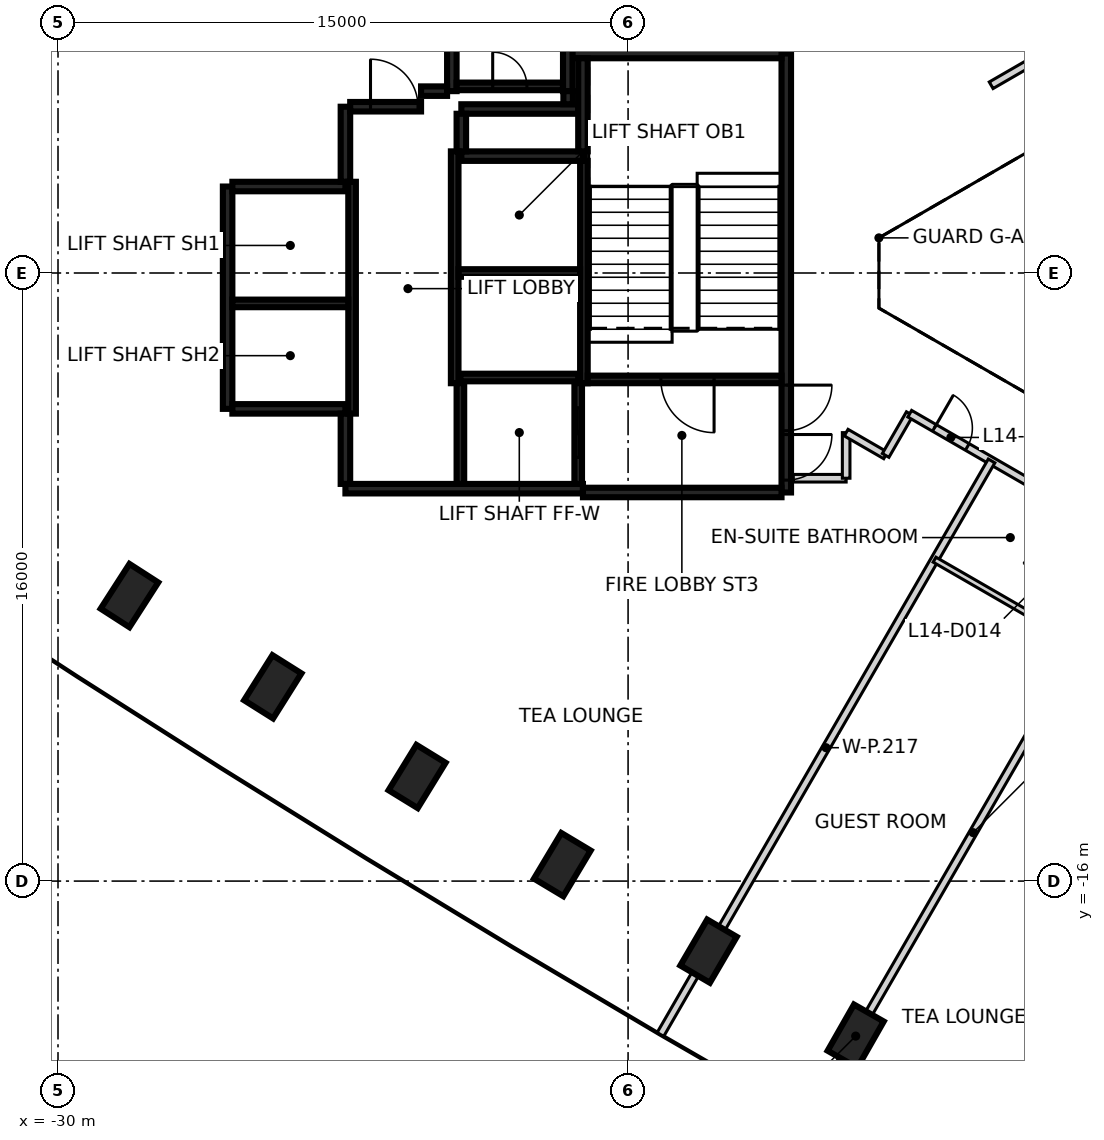
"""IFC4 building model, lengths in metres.
Left out: names, types, materials, properties, quantities, classifications, styles, units other than length and angle.
Written with IfcOpenShell. Run it as: python <this file> out.ifc"""

import sys

from ifc_helpers import new_model, si_unit, direction, frame, frame_2d, origin, origin_2d, place, context, subcontext, project, spatial, rectangle, extrude, element, fill, save


model = new_model("IFC4")
c1 = context("Model", 3, precision=1e-05, world=origin(), true_north=direction((0.0, 1.0)))
c2 = subcontext(c1, "Body", "Model", "MODEL_VIEW")
j1 = project(units=[si_unit("LENGTHUNIT", "METRE"), si_unit("PLANEANGLEUNIT", "RADIAN")], contexts=[c1])
p1 = place(None, origin())
s1 = spatial("IfcSite", under=j1, at=p1, CompositionType="ELEMENT")
p2 = place(p1, origin())
s2 = spatial("IfcBuilding", under=s1, at=p2, CompositionType="ELEMENT")
p3 = place(p2, frame((0.0, 0.0, 63.8)))
s3 = spatial("IfcBuildingStorey", under=s2, at=p3, CompositionType="ELEMENT", Elevation=63.8)
for number, where, z_axis, x_axis in (
    (1, (-28.12, -8.488, -0.475), (0.0, 0.0, 1.0), (0.541, 0.841, 0.0)),
    (2, (-24.349, -10.888, -0.475), (0.0, 0.0, 1.0), (0.532, 0.846, 0.0)),
    (3, (-20.552, -13.248, -0.475), (0.0, 0.0, 1.0), (0.523, 0.852, 0.0)),
    (4, (-16.73, -15.566, -0.475), (0.0, 0.0, 1.0), (0.514, 0.858, 0.0)),
    (5, (-12.883, -17.844, -0.475), (0.0, 0.0, 1.0), (0.505, 0.863, 0.0)),
    (6, (-9.011, -20.079, -0.475), (0.0, 0.0, 1.0), (0.495, 0.869, 0.0)),
):
    element("IfcColumn", number, at=place(p3, frame(where, z_axis=z_axis, x_axis=x_axis)), inside=s3, PredefinedType="COLUMN", context=c2, shape_type="SweptSolid", body=[
        extrude(rectangle(XDim=1.4, YDim=0.9, at=origin_2d()), origin(), (0.0, 0.0, 1.0), 3.6),
    ])
p4 = place(p3, frame((-10.837, 5.775, 0.0), z_axis=(0.0, 0.0, 1.0), x_axis=(0.0, -1.0, 0.0)))
e7 = element("IfcWall", 7, at=p4, inside=s3, PredefinedType="SHEAR", context=c2, shape_type="SweptSolid", body=[
    extrude(rectangle(XDim=11.55, YDim=0.25, at=frame_2d((5.775, 0.0))), origin(), (0.0, 0.0, 1.0), 3.125),
])
p5 = place(p4, frame((10.025, 0.0, 0.0)))
e8 = element("IfcOpeningElement", 8, at=p5, cuts=e7, PredefinedType="OPENING", context=c2, shape_type="SweptSolid", body=[
    extrude(rectangle(XDim=1.2, YDim=2.1, at=frame_2d((0.6, 1.05))), frame((0.0, 0.135, 0.0), z_axis=(0.0, -1.0, 0.0), x_axis=(1.0, 0.0, 0.0)), (0.0, 0.0, 1.0), 0.27),
])
p6 = place(p4, frame((8.725, 0.0, 0.0)))
e9 = element("IfcOpeningElement", 9, at=p6, cuts=e7, PredefinedType="OPENING", context=c2, shape_type="SweptSolid", body=[
    extrude(rectangle(XDim=1.2, YDim=2.1, at=frame_2d((0.6, 1.05))), frame((0.0, 0.135, 0.0), z_axis=(0.0, -1.0, 0.0), x_axis=(1.0, 0.0, 0.0)), (0.0, 0.0, 1.0), 0.27),
])
p7 = place(p3, frame((-16.187, -5.675, 0.0), z_axis=(0.0, 0.0, 1.0), x_axis=(-1.0, 0.0, 0.0)))
e10 = element("IfcWall", 10, at=p7, inside=s3, PredefinedType="SHEAR", context=c2, shape_type="SweptSolid", body=[
    extrude(rectangle(XDim=6.25, YDim=0.25, at=frame_2d((3.125, 0.0))), origin(), (0.0, 0.0, 1.0), 3.125),
])
p8 = place(p3, frame((-25.537, -3.575, 0.0), z_axis=(0.0, 0.0, 1.0), x_axis=(0.0, 1.0, 0.0)))
e11 = element("IfcWall", 11, at=p8, inside=s3, PredefinedType="SHEAR", context=c2, shape_type="SweptSolid", body=[
    extrude(rectangle(XDim=5.85, YDim=0.25, at=frame_2d((2.925, 0.0))), origin(), (0.0, 0.0, 1.0), 3.125),
])
p9 = place(p3, frame((-10.963, -5.775, 0.0), z_axis=(0.0, 0.0, 1.0), x_axis=(-1.0, 0.0, 0.0)))
e12 = element("IfcWall", 12, at=p9, inside=s3, PredefinedType="SHEAR", context=c2, shape_type="SweptSolid", body=[
    extrude(rectangle(XDim=5.225, YDim=0.25, at=frame_2d((2.612, 0.0))), origin(), (0.0, 0.0, 1.0), 3.125),
])
p10 = place(p3, frame((-16.472, 5.775, 0.0), z_axis=(0.0, 0.0, 1.0), x_axis=(1.0, 0.0, 0.0)))
e13 = element("IfcWall", 13, at=p10, inside=s3, PredefinedType="SHEAR", context=c2, shape_type="SweptSolid", body=[
    extrude(rectangle(XDim=5.51, YDim=0.25, at=frame_2d((2.755, 0.0))), origin(), (0.0, 0.0, 1.0), 3.125),
])
p11 = place(p3, frame((-19.387, 3.075, 0.0), z_axis=(0.0, 0.0, 1.0), x_axis=(1.0, 0.0, 0.0)))
e14 = element("IfcWall", 14, at=p11, inside=s3, PredefinedType="SHEAR", context=c2, shape_type="SweptSolid", body=[
    extrude(rectangle(XDim=3.2, YDim=0.25, at=frame_2d((1.6, 0.0))), origin(), (0.0, 0.0, 1.0), 3.125),
])
for number, where, z_axis, x_axis in (
    (15, (-22.437, -3.575, 0.0), (0.0, 0.0, 1.0), (-1.0, 0.0, 0.0)),
    (16, (-25.412, 2.275, 0.0), (0.0, 0.0, 1.0), (1.0, 0.0, 0.0)),
):
    element("IfcWall", number, at=place(p3, frame(where, z_axis=z_axis, x_axis=x_axis)), inside=s3, PredefinedType="SHEAR", context=c2, shape_type="SweptSolid", body=[
        extrude(rectangle(XDim=2.975, YDim=0.25, at=frame_2d((1.487, 0.0))), origin(), (0.0, 0.0, 1.0), 3.125),
    ])
for number, where, z_axis, x_axis in (
    (17, (-16.587, 7.65, 0.0), (0.0, 0.0, 1.0), (0.0, -1.0, 0.0)),
    (18, (-19.637, 4.785, 0.0), (0.0, 0.0, 1.0), (0.0, 1.0, 0.0)),
):
    element("IfcWall", number, at=place(p3, frame(where, z_axis=z_axis, x_axis=x_axis)), inside=s3, PredefinedType="SHEAR", context=c2, shape_type="SweptSolid", body=[
        extrude(rectangle(XDim=2.865, YDim=0.25, at=frame_2d((1.432, 0.0))), origin(), (0.0, 0.0, 1.0), 3.125),
    ])
p12 = place(p3, frame((-16.302, 4.315, 0.0), z_axis=(0.0, 0.0, 1.0), x_axis=(-1.0, 0.0, 0.0)))
e19 = element("IfcWall", 19, at=p12, inside=s3, PredefinedType="SHEAR", context=c2, shape_type="SweptSolid", body=[
    extrude(rectangle(XDim=3.085, YDim=0.25, at=frame_2d((1.542, 0.0))), origin(), (0.0, 0.0, 1.0), 3.125),
])
p13 = place(p3, frame((-16.187, 3.2, 0.0), z_axis=(0.0, 0.0, 1.0), x_axis=(0.0, 1.0, 0.0)))
e20 = element("IfcWall", 20, at=p13, inside=s3, PredefinedType="SHEAR", context=c2, shape_type="SweptSolid", body=[
    extrude(rectangle(XDim=2.449, YDim=0.25, at=frame_2d((1.225, 0.0))), origin(), (0.0, 0.0, 1.0), 3.125),
])
p14 = place(p3, frame((-22.437, 2.4, 0.0), z_axis=(0.0, 0.0, 1.0), x_axis=(0.0, 1.0, 0.0)))
e21 = element("IfcWall", 21, at=p14, inside=s3, PredefinedType="SHEAR", context=c2, shape_type="SweptSolid", body=[
    extrude(rectangle(XDim=1.975, YDim=0.25, at=frame_2d((0.987, 0.0))), origin(), (0.0, 0.0, 1.0), 3.125),
])
p15 = place(p3, frame((-22.437, -5.55, 0.0), z_axis=(0.0, 0.0, 1.0), x_axis=(0.0, 1.0, 0.0)))
e22 = element("IfcWall", 22, at=p15, inside=s3, PredefinedType="SHEAR", context=c2, shape_type="SweptSolid", body=[
    extrude(rectangle(XDim=1.849, YDim=0.25, at=frame_2d((0.925, 0.0))), origin(), (0.0, 0.0, 1.0), 3.125),
])
p16 = place(p3, frame((-22.312, 4.375, 0.0), z_axis=(0.0, 0.0, 1.0), x_axis=(1.0, 0.0, 0.0)))
e23 = element("IfcWall", 23, at=p16, inside=s3, PredefinedType="SHEAR", context=c2, shape_type="SweptSolid", body=[
    extrude(rectangle(XDim=1.865, YDim=0.25, at=frame_2d((0.932, 0.0))), origin(), (0.0, 0.0, 1.0), 3.125),
])
p17 = place(p16, frame((0.535, 0.0, 0.0)))
e24 = element("IfcOpeningElement", 24, at=p17, cuts=e23, PredefinedType="OPENING", context=c2, shape_type="SweptSolid", body=[
    extrude(rectangle(XDim=1.25, YDim=2.1, at=frame_2d((0.625, 1.05))), frame((0.0, 0.135, 0.0), z_axis=(0.0, -1.0, 0.0), x_axis=(1.0, 0.0, 0.0)), (0.0, 0.0, 1.0), 0.27),
])
p18 = place(p3, frame((-19.387, 4.19, 0.0), z_axis=(0.0, 0.0, 1.0), x_axis=(0.0, -1.0, 0.0)))
e25 = element("IfcWall", 25, at=p18, inside=s3, PredefinedType="SHEAR", context=c2, shape_type="SweptSolid", body=[
    extrude(rectangle(XDim=0.989, YDim=0.25, at=frame_2d((0.495, 0.0))), origin(), (0.0, 0.0, 1.0), 3.125),
])
p19 = place(p3, frame((-20.447, 4.785, 0.0), z_axis=(0.0, 0.0, 1.0), x_axis=(1.0, 0.0, 0.0)))
e26 = element("IfcWall", 26, at=p19, inside=s3, PredefinedType="SHEAR", context=c2, shape_type="SweptSolid", body=[
    extrude(rectangle(XDim=0.685, YDim=0.25, at=frame_2d((0.342, 0.0))), origin(), (0.0, 0.0, 1.0), 3.125),
])
p20 = place(p3, frame((-16.577, 4.785, 0.0), z_axis=(0.0, 0.0, 1.0), x_axis=(0.0, -1.0, 0.0)))
e27 = element("IfcWall", 27, at=p20, inside=s3, PredefinedType="SHEAR", context=c2, shape_type="SweptSolid", body=[
    extrude(rectangle(XDim=0.344, YDim=0.25, at=frame_2d((0.172, 0.0))), origin(), (0.0, 0.0, 1.0), 3.125),
])
p21 = place(p3, frame((-16.162, 2.951, 0.0), z_axis=(0.0, 0.0, 1.0), x_axis=(0.0, -1.0, 0.0)))
e28 = element("IfcWall", 28, at=p21, inside=s3, PredefinedType="SHEAR", context=c2, shape_type="SweptSolid", body=[
    extrude(rectangle(XDim=5.851, YDim=0.2, at=frame_2d((2.925, 0.0))), origin(), (0.0, 0.0, 1.0), 3.125),
])
for number, where, z_axis, x_axis in (
    (29, (-19.562, -2.9, 0.0), (0.0, 0.0, 1.0), (0.0, 1.0, 0.0)),
    (30, (-22.262, 2.4, 0.0), (0.0, 0.0, 1.0), (0.0, -1.0, 0.0)),
):
    element("IfcWall", number, at=place(p3, frame(where, z_axis=z_axis, x_axis=x_axis)), inside=s3, PredefinedType="SHEAR", context=c2, shape_type="SweptSolid", body=[
        extrude(rectangle(XDim=6.1, YDim=0.2, at=frame_2d((3.05, 0.0))), origin(), (0.0, 0.0, 1.0), 3.125),
    ])
p22 = place(p3, frame((-10.963, -2.8, 0.0), z_axis=(0.0, 0.0, 1.0), x_axis=(-1.0, 0.0, 0.0)))
e31 = element("IfcWall", 31, at=p22, inside=s3, PredefinedType="SHEAR", context=c2, shape_type="SweptSolid", body=[
    extrude(rectangle(XDim=5.098, YDim=0.2, at=frame_2d((2.549, 0.0))), origin(), (0.0, 0.0, 1.0), 3.125),
])
p23 = place(p22, frame((1.774, 0.0, 0.0)))
e32 = element("IfcOpeningElement", 32, at=p23, cuts=e31, PredefinedType="OPENING", context=c2, shape_type="SweptSolid", body=[
    extrude(rectangle(XDim=1.4, YDim=2.1, at=frame_2d((0.7, 1.05))), frame((0.0, 0.11, 0.0), z_axis=(0.0, -1.0, 0.0), x_axis=(1.0, 0.0, 0.0)), (0.0, 0.0, 1.0), 0.22),
])
p24 = place(p3, frame((-16.263, 0.0, 0.0), z_axis=(0.0, 0.0, 1.0), x_axis=(-1.0, 0.0, 0.0)))
e33 = element("IfcWall", 33, at=p24, inside=s3, PredefinedType="SHEAR", context=c2, shape_type="SweptSolid", body=[
    extrude(rectangle(XDim=3.198, YDim=0.2, at=frame_2d((1.599, 0.0))), origin(), (0.0, 0.0, 1.0), 3.125),
])
p25 = place(p3, frame((-22.363, -0.8, 0.0), z_axis=(0.0, 0.0, 1.0), x_axis=(-1.0, 0.0, 0.0)))
e34 = element("IfcWall", 34, at=p25, inside=s3, PredefinedType="SHEAR", context=c2, shape_type="SweptSolid", body=[
    extrude(rectangle(XDim=3.048, YDim=0.2, at=frame_2d((1.524, 0.0))), origin(), (0.0, 0.0, 1.0), 3.125),
])
p26 = place(p3, frame((-19.511, 4.91, 0.0), z_axis=(0.0, 0.0, 1.0), x_axis=(1.0, 0.0, 0.0)))
e35 = element("IfcWall", 35, at=p26, inside=s3, PredefinedType="SHEAR", context=c2, shape_type="SweptSolid", body=[
    extrude(rectangle(XDim=2.798, YDim=0.2, at=frame_2d((1.399, 0.0))), origin(), (0.0, 0.0, 1.0), 3.125),
])
p27 = place(p26, frame((0.949, 0.0, 0.0)))
e36 = element("IfcOpeningElement", 36, at=p27, cuts=e35, PredefinedType="OPENING", context=c2, shape_type="SweptSolid", body=[
    extrude(rectangle(XDim=0.9, YDim=2.1, at=frame_2d((0.45, 1.05))), frame((0.0, 0.11, 0.0), z_axis=(0.0, -1.0, 0.0), x_axis=(1.0, 0.0, 0.0)), (0.0, 0.0, 1.0), 0.22),
])
p28 = place(p3, frame((-19.412, -2.75, 0.0), z_axis=(0.0, 0.0, 1.0), x_axis=(1.0, 0.0, 0.0)))
e37 = element("IfcWall", 37, at=p28, inside=s3, PredefinedType="SHEAR", context=c2, shape_type="SweptSolid", body=[
    extrude(rectangle(XDim=3.1, YDim=0.2, at=frame_2d((1.55, 0.0))), origin(), (0.0, 0.0, 1.0), 3.125),
])
p29 = place(p3, frame((-16.312, -2.898, 0.0), z_axis=(0.0, 0.0, 1.0), x_axis=(0.0, -1.0, 0.0)))
e38 = element("IfcWall", 38, at=p29, inside=s3, PredefinedType="SHEAR", context=c2, shape_type="SweptSolid", body=[
    extrude(rectangle(XDim=2.651, YDim=0.2, at=frame_2d((1.325, 0.0))), origin(), (0.0, 0.0, 1.0), 3.125),
])
p30 = place(p29, frame((0.652, 0.0, 0.0)))
e39 = element("IfcOpeningElement", 39, at=p30, cuts=e38, PredefinedType="OPENING", context=c2, shape_type="SweptSolid", body=[
    extrude(rectangle(XDim=1.3, YDim=2.1, at=frame_2d((0.65, 1.05))), frame((0.0, 0.11, 0.0), z_axis=(0.0, -1.0, 0.0), x_axis=(1.0, 0.0, 0.0)), (0.0, 0.0, 1.0), 0.22),
])
p31 = place(p3, frame((-19.412, -5.549, 0.0), z_axis=(0.0, 0.0, 1.0), x_axis=(0.0, 1.0, 0.0)))
e40 = element("IfcWall", 40, at=p31, inside=s3, PredefinedType="SHEAR", context=c2, shape_type="SweptSolid", body=[
    extrude(rectangle(XDim=2.651, YDim=0.2, at=frame_2d((1.325, 0.0))), origin(), (0.0, 0.0, 1.0), 3.125),
])
p32 = place(p3, frame((-10.652, -5.4, 0.0), z_axis=(0.0, 0.0, 1.0), x_axis=(1.0, 0.0, 0.0)))
e41 = element("IfcWall", 41, at=p32, inside=s3, PredefinedType="PARTITIONING", context=c2, shape_type="SweptSolid", body=[
    extrude(rectangle(XDim=1.39, YDim=0.2, at=frame_2d((0.695, 0.0))), origin(), (0.0, 0.0, 1.0), 3.125),
])
for number, where, z_axis, x_axis in (
    (42, (-9.262, -5.4, 0.0), (0.0, 0.0, 1.0), (0.0, 1.0, 0.0)),
    (43, (-9.262, -4.2, 0.0), (0.0, 0.0, 1.0), (0.866, -0.5, 0.0)),
):
    element("IfcWall", number, at=place(p3, frame(where, z_axis=z_axis, x_axis=x_axis)), inside=s3, PredefinedType="PARTITIONING", context=c2, shape_type="SweptSolid", body=[
        extrude(rectangle(XDim=1.2, YDim=0.2, at=frame_2d((0.6, 0.0))), origin(), (0.0, 0.0, 1.0), 3.125),
    ])
p33 = place(p3, frame((-8.223, -4.8, 0.0), z_axis=(0.0, 0.0, 1.0), x_axis=(0.499866914522, 0.866102227088, 0.0)))
e44 = element("IfcWall", 44, at=p33, inside=s3, PredefinedType="PARTITIONING", context=c2, shape_type="SweptSolid", body=[
    extrude(rectangle(XDim=1.268, YDim=0.2, at=frame_2d((0.634, 0.0))), origin(), (0.0, 0.0, 1.0), 3.125),
])
p34 = place(p3, frame((-7.589, -3.702, 0.0), z_axis=(0.0, 0.0, 1.0), x_axis=(0.865995139556, -0.500052415518, 0.0)))
e45 = element("IfcWall", 45, at=p34, inside=s3, PredefinedType="PARTITIONING", context=c2, shape_type="SweptSolid", body=[
    extrude(rectangle(XDim=8.689, YDim=0.2, at=frame_2d((4.344, 0.0))), origin(), (0.0, 0.0, 1.0), 3.125),
])
p35 = place(p34, frame((0.749, 0.0, 0.0)))
e46 = element("IfcOpeningElement", 46, at=p35, cuts=e45, PredefinedType="OPENING", context=c2, shape_type="SweptSolid", body=[
    extrude(rectangle(XDim=1.0, YDim=2.1, at=frame_2d((0.5, 1.05))), frame((0.0, 0.11, 0.0), z_axis=(0.0, -1.0, 0.0), x_axis=(1.0, 0.0, 0.0)), (0.0, 0.0, 1.0), 0.22),
])
p36 = place(p34, frame((5.819, 0.0, 0.0)))
e47 = element("IfcOpeningElement", 47, at=p36, cuts=e45, PredefinedType="OPENING", context=c2, shape_type="SweptSolid", body=[
    extrude(rectangle(XDim=0.95, YDim=2.1, at=frame_2d((0.475, 1.05))), frame((0.0, 0.11, 0.0), z_axis=(0.0, -1.0, 0.0), x_axis=(1.0, 0.0, 0.0)), (0.0, 0.0, 1.0), 0.22),
])
p37 = place(p3, frame((-5.446, 4.94, 0.0), z_axis=(0.0, 0.0, 1.0), x_axis=(0.866096332545, 0.499877127655, 0.0)))
e48 = element("IfcWall", 48, at=p37, inside=s3, PredefinedType="PARTITIONING", context=c2, shape_type="SweptSolid", body=[
    extrude(rectangle(XDim=6.969, YDim=0.2, at=frame_2d((3.484, 0.0))), origin(), (0.0, 0.0, 1.0), 3.125),
])
p38 = place(p37, frame((5.219, 0.0, 0.0)))
e49 = element("IfcOpeningElement", 49, at=p38, cuts=e48, PredefinedType="OPENING", context=c2, shape_type="SweptSolid", body=[
    extrude(rectangle(XDim=1.0, YDim=2.1, at=frame_2d((0.5, 1.05))), frame((0.0, 0.11, 0.0), z_axis=(0.0, -1.0, 0.0), x_axis=(1.0, 0.0, 0.0)), (0.0, 0.0, 1.0), 0.22),
])
p39 = place(p37, frame((3.344, 0.0, 0.0)))
e50 = element("IfcOpeningElement", 50, at=p39, cuts=e48, PredefinedType="OPENING", context=c2, shape_type="SweptSolid", body=[
    extrude(rectangle(XDim=0.95, YDim=2.1, at=frame_2d((0.475, 1.05))), frame((0.0, 0.11, 0.0), z_axis=(0.0, -1.0, 0.0), x_axis=(1.0, 0.0, 0.0)), (0.0, 0.0, 1.0), 0.22),
])
p40 = place(p3, frame((-14.148, -20.035, 0.0), z_axis=(0.0, 0.0, 1.0), x_axis=(0.500005855417, 0.866022023131, 0.0)))
e51 = element("IfcWall", 51, at=p40, inside=s3, PredefinedType="PARTITIONING", context=c2, shape_type="SweptSolid", body=[
    extrude(rectangle(XDim=17.425, YDim=0.2, at=frame_2d((8.712, 0.0))), origin(), (0.0, 0.0, 1.0), 3.125),
])
p41 = place(p3, frame((-10.276, -22.271, 0.0), z_axis=(0.0, 0.0, 1.0), x_axis=(0.49999372146, 0.866029028671, 0.0)))
e52 = element("IfcWall", 52, at=p41, inside=s3, PredefinedType="PARTITIONING", context=c2, shape_type="SweptSolid", body=[
    extrude(rectangle(XDim=17.425, YDim=0.2, at=frame_2d((8.712, 0.0))), origin(), (0.0, 0.0, 1.0), 3.125),
])
p42 = place(p3, frame((-6.381, -24.464, 0.0), z_axis=(0.0, 0.0, 1.0), x_axis=(0.500007577232, 0.866021029023, 0.0)))
e53 = element("IfcWall", 53, at=p42, inside=s3, PredefinedType="PARTITIONING", context=c2, shape_type="SweptSolid", body=[
    extrude(rectangle(XDim=9.883, YDim=0.2, at=frame_2d((4.941, 0.0))), origin(), (0.0, 0.0, 1.0), 3.125),
])
p43 = place(p3, frame((-6.936, -7.543, 0.0), z_axis=(0.0, 0.0, 1.0), x_axis=(0.866153027342, -0.499778884334, 0.0)))
e54 = element("IfcWall", 54, at=p43, inside=s3, PredefinedType="PARTITIONING", context=c2, shape_type="SweptSolid", body=[
    extrude(rectangle(XDim=2.871, YDim=0.15, at=frame_2d((1.436, 0.0))), origin(), (0.0, 0.0, 1.0), 3.125),
])
p44 = place(p30, origin())
e55 = element("IfcDoor", 55, at=p44, inside=s3, OperationType="SLIDING_TO_RIGHT", PredefinedType="DOOR", context=c2, shape_type="SweptSolid", body=[
    extrude(rectangle(XDim=1.3, YDim=2.1, at=frame_2d((0.65, 1.05))), frame((0.0, 0.025, 0.0), z_axis=(0.0, -1.0, 0.0), x_axis=(1.0, 0.0, 0.0)), (0.0, 0.0, 1.0), 0.05),
])
fill(e39, e55)
p45 = place(p17, origin())
e56 = element("IfcDoor", 56, at=p45, inside=s3, OperationType="SINGLE_SWING_LEFT", PredefinedType="DOOR", context=c2, shape_type="SweptSolid", body=[
    extrude(rectangle(XDim=1.25, YDim=2.1, at=frame_2d((0.625, 1.05))), frame((0.0, 0.025, 0.0), z_axis=(0.0, -1.0, 0.0), x_axis=(1.0, 0.0, 0.0)), (0.0, 0.0, 1.0), 0.05),
])
fill(e24, e56)
p46 = place(p5, origin())
e57 = element("IfcDoor", 57, at=p46, inside=s3, OperationType="SINGLE_SWING_LEFT", PredefinedType="DOOR", context=c2, shape_type="SweptSolid", body=[
    extrude(rectangle(XDim=1.2, YDim=2.1, at=frame_2d((0.6, 1.05))), frame((0.0, 0.025, 0.0), z_axis=(0.0, -1.0, 0.0), x_axis=(1.0, 0.0, 0.0)), (0.0, 0.0, 1.0), 0.05),
])
fill(e8, e57)
p47 = place(p6, origin())
e58 = element("IfcDoor", 58, at=p47, inside=s3, OperationType="SINGLE_SWING_RIGHT", PredefinedType="DOOR", context=c2, shape_type="SweptSolid", body=[
    extrude(rectangle(XDim=1.2, YDim=2.1, at=frame_2d((0.6, 1.05))), frame((0.0, 0.025, 0.0), z_axis=(0.0, -1.0, 0.0), x_axis=(1.0, 0.0, 0.0)), (0.0, 0.0, 1.0), 0.05),
])
fill(e9, e58)
p48 = place(p23, origin())
e59 = element("IfcDoor", 59, at=p48, inside=s3, OperationType="SINGLE_SWING_RIGHT", PredefinedType="DOOR", context=c2, shape_type="SweptSolid", body=[
    extrude(rectangle(XDim=1.4, YDim=2.1, at=frame_2d((0.7, 1.05))), frame((0.0, 0.025, 0.0), z_axis=(0.0, -1.0, 0.0), x_axis=(1.0, 0.0, 0.0)), (0.0, 0.0, 1.0), 0.05),
])
fill(e32, e59)
p49 = place(p27, origin())
e60 = element("IfcDoor", 60, at=p49, inside=s3, OperationType="SINGLE_SWING_LEFT", PredefinedType="DOOR", context=c2, shape_type="SweptSolid", body=[
    extrude(rectangle(XDim=0.9, YDim=2.1, at=frame_2d((0.45, 1.05))), frame((0.0, 0.025, 0.0), z_axis=(0.0, -1.0, 0.0), x_axis=(1.0, 0.0, 0.0)), (0.0, 0.0, 1.0), 0.05),
])
fill(e36, e60)
p50 = place(p35, frame((1.0, 0.0, 0.0), z_axis=(0.0, 0.0, 1.0), x_axis=(-1.0, 0.0, 0.0)))
e61 = element("IfcDoor", 61, at=p50, inside=s3, OperationType="SINGLE_SWING_LEFT", PredefinedType="DOOR", context=c2, shape_type="SweptSolid", body=[
    extrude(rectangle(XDim=1.0, YDim=2.1, at=frame_2d((0.5, 1.05))), frame((0.0, 0.025, 0.0), z_axis=(0.0, -1.0, 0.0), x_axis=(1.0, 0.0, 0.0)), (0.0, 0.0, 1.0), 0.05),
])
fill(e46, e61)
save(model, sys.argv[1])
